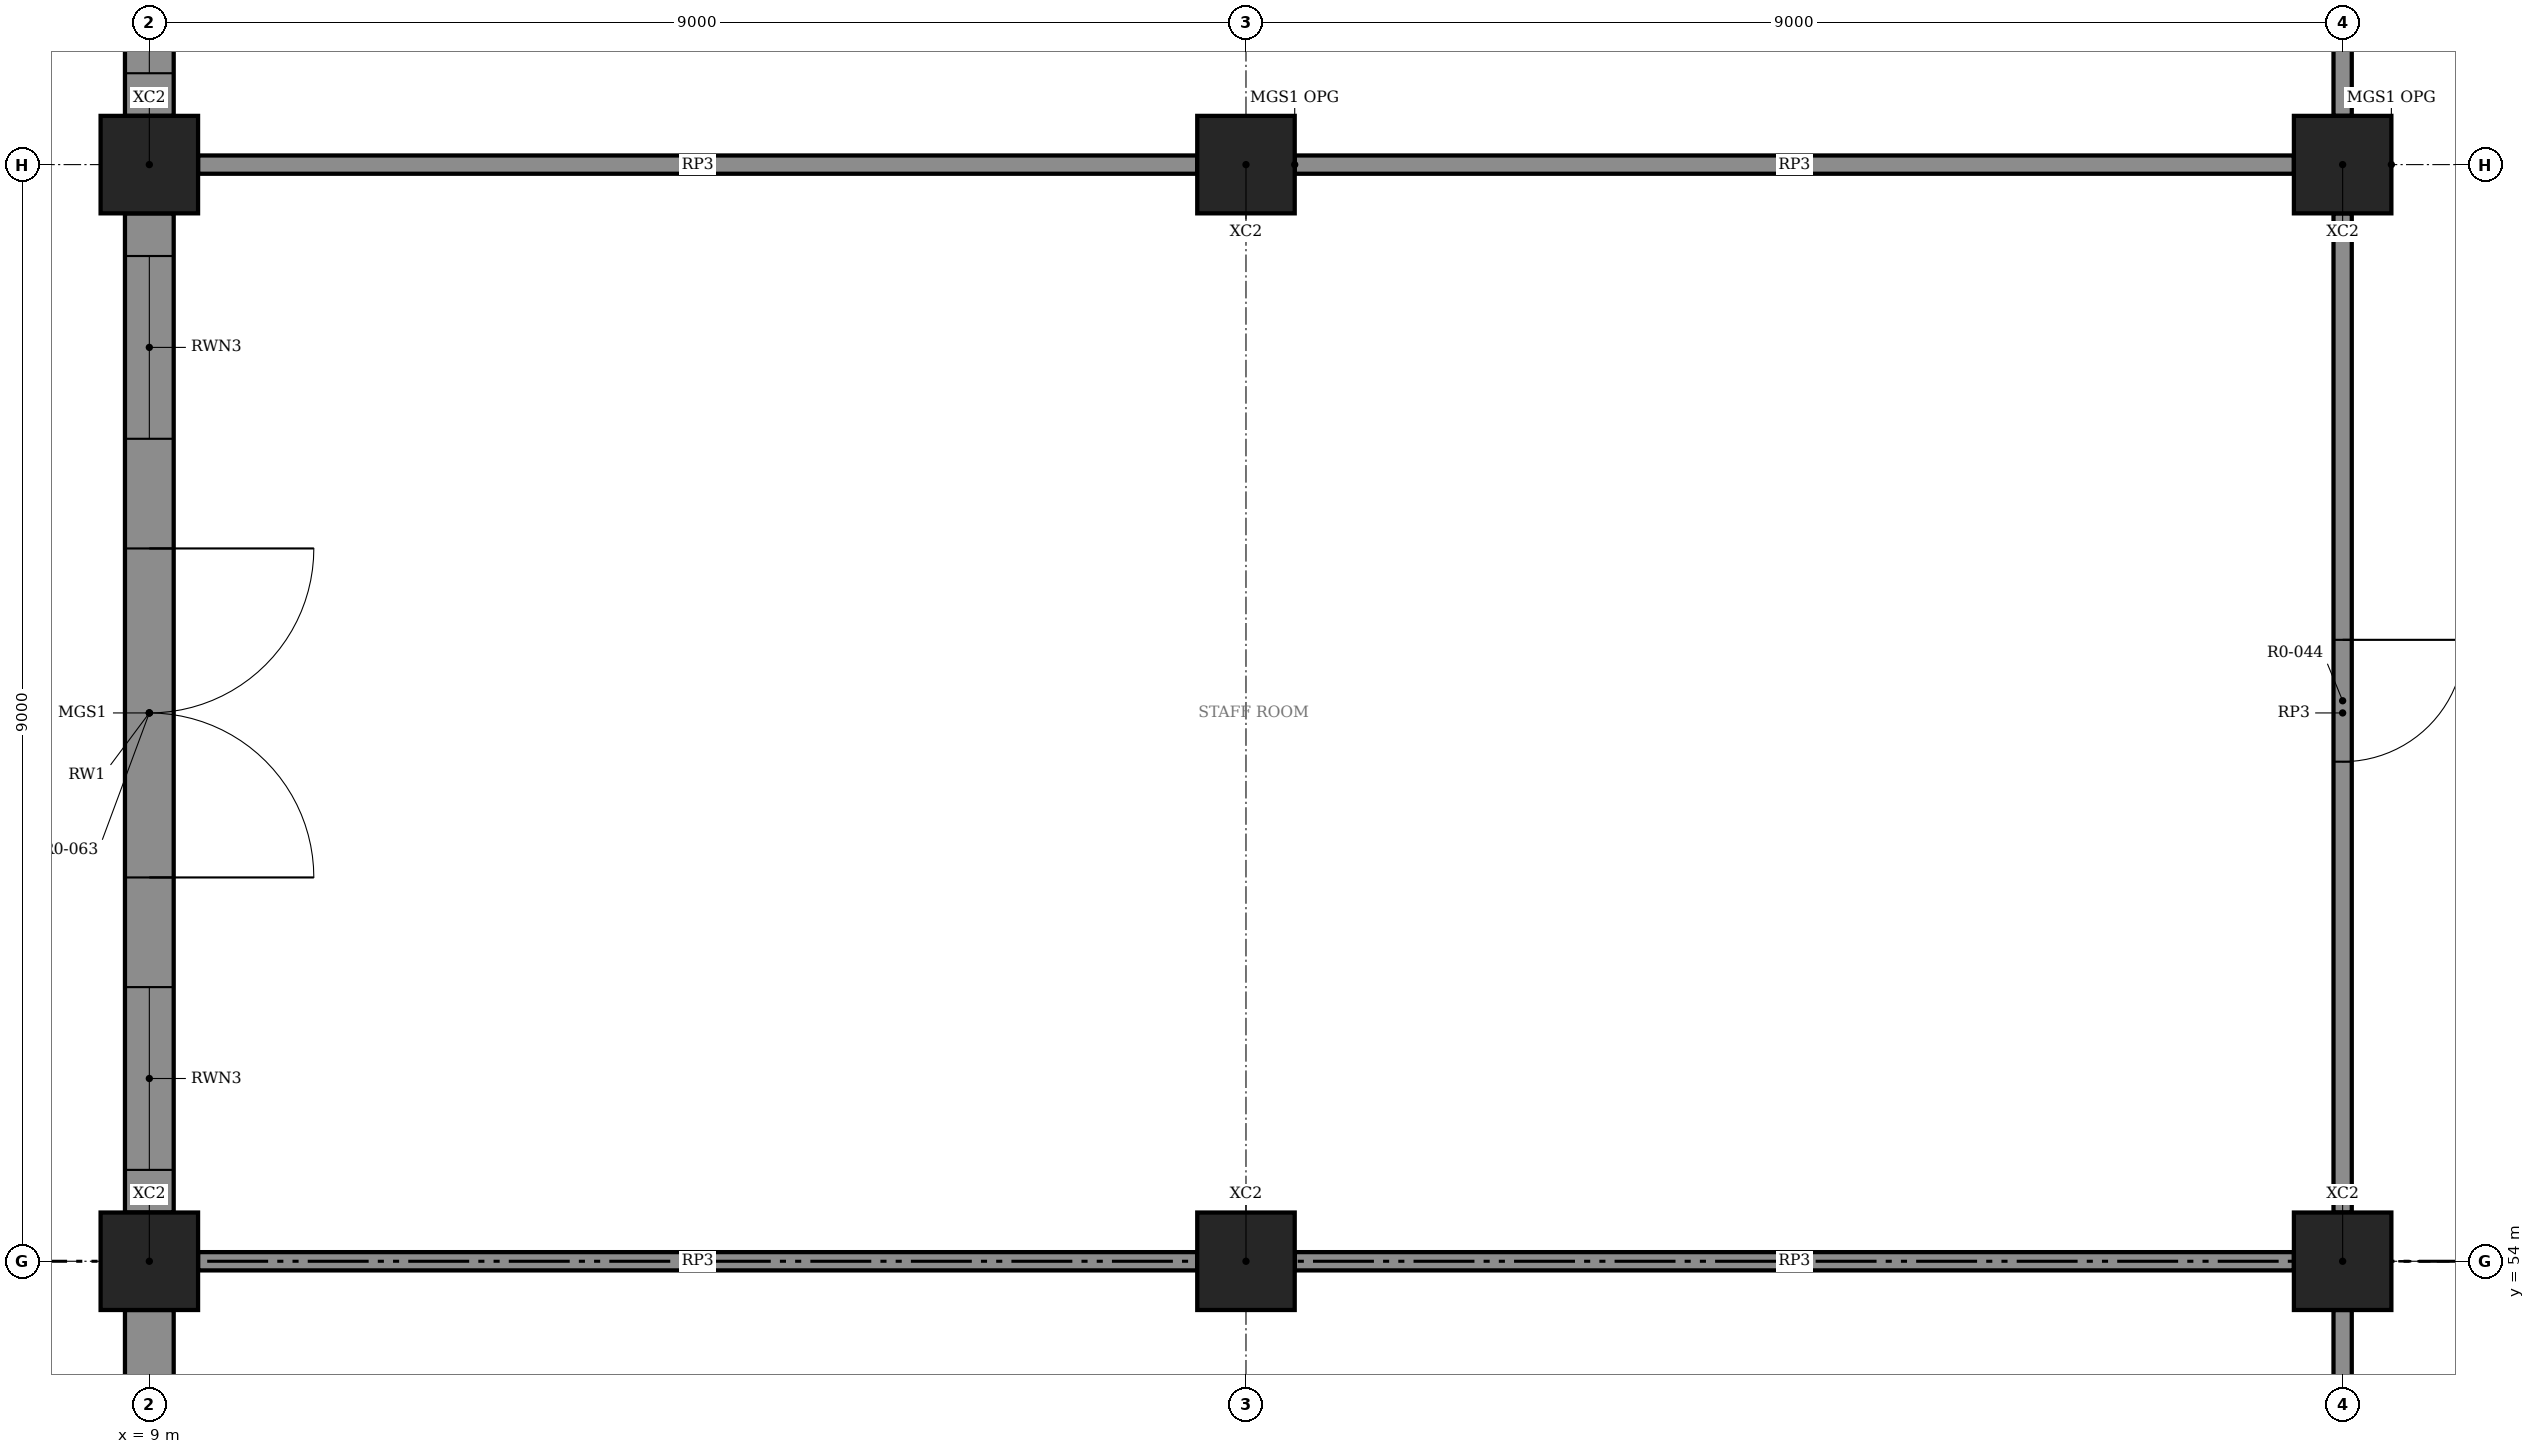
"""IFC4 building model, lengths in metres.
Left out: names, types, materials, properties, quantities, classifications, styles, units other than length and angle.
Written with IfcOpenShell. Run it as: python <this file> out.ifc"""

import sys

from ifc_helpers import new_model, si_unit, direction, frame, frame_2d, origin, origin_2d, place, context, subcontext, project, spatial, rectangle, extrude, element, fill, save


model = new_model("IFC4")
c1 = context("Model", 3, precision=1e-05, world=origin(), true_north=direction((0.0, 1.0)))
c2 = subcontext(c1, "Body", "Model", "MODEL_VIEW")
j1 = project(units=[si_unit("LENGTHUNIT", "METRE"), si_unit("PLANEANGLEUNIT", "RADIAN")], contexts=[c1])
p1 = place(None, origin())
s1 = spatial("IfcSite", under=j1, at=p1, CompositionType="ELEMENT")
p2 = place(p1, origin())
s2 = spatial("IfcBuilding", under=s1, at=p2, CompositionType="ELEMENT")
p3 = place(p2, origin())
s3 = spatial("IfcBuildingStorey", under=s2, at=p3, CompositionType="ELEMENT", Elevation=0.0)
for number, where, z_axis, x_axis in (
    (1, (9.0, 54.0, -0.3), (0.0, 0.0, 1.0), (1.0, 0.0, 0.0)),
    (2, (9.0, 63.0, -0.3), (0.0, 0.0, 1.0), (1.0, 0.0, 0.0)),
    (3, (18.0, 54.0, -0.3), (0.0, 0.0, 1.0), (1.0, 0.0, 0.0)),
    (4, (18.0, 63.0, -0.3), (0.0, 0.0, 1.0), (1.0, 0.0, 0.0)),
    (5, (27.0, 54.0, -0.3), (0.0, 0.0, 1.0), (1.0, 0.0, 0.0)),
    (6, (27.0, 63.0, -0.3), (0.0, 0.0, 1.0), (1.0, 0.0, 0.0)),
):
    element("IfcColumn", number, at=place(p3, frame(where, z_axis=z_axis, x_axis=x_axis)), inside=s3, PredefinedType="COLUMN", context=c2, shape_type="SweptSolid", body=[
        extrude(rectangle(XDim=0.8, YDim=0.8, at=origin_2d()), origin(), (0.0, 0.0, 1.0), 6.3),
    ])
p4 = place(p3, frame((9.0, 45.4, 0.0), z_axis=(0.0, 0.0, 1.0), x_axis=(0.0, 1.0, 0.0)))
e7 = element("IfcWall", 7, at=p4, inside=s3, PredefinedType="SOLIDWALL", context=c2, shape_type="SweptSolid", body=[
    extrude(rectangle(XDim=8.2, YDim=0.4, at=frame_2d((4.1, 0.0))), origin(), (0.0, 0.0, 1.0), 4.82),
])
p5 = place(p3, frame((9.0, 54.4, 0.0), z_axis=(0.0, 0.0, 1.0), x_axis=(0.0, 1.0, 0.0)))
e8 = element("IfcWall", 8, at=p5, inside=s3, PredefinedType="SOLIDWALL", context=c2, shape_type="SweptSolid", body=[
    extrude(rectangle(XDim=8.2, YDim=0.4, at=frame_2d((4.1, 0.0))), origin(), (0.0, 0.0, 1.0), 4.82),
])
p6 = place(p5, frame((0.35, 0.0, 0.6)))
e9 = element("IfcOpeningElement", 9, at=p6, cuts=e8, PredefinedType="OPENING", context=c2, shape_type="SweptSolid", body=[
    extrude(rectangle(XDim=1.5, YDim=2.7, at=frame_2d((0.75, 1.35))), frame((0.0, 0.21, 0.0), z_axis=(0.0, -1.0, 0.0), x_axis=(1.0, 0.0, 0.0)), (0.0, 0.0, 1.0), 0.42),
])
p7 = place(p5, frame((6.35, 0.0, 0.6)))
e10 = element("IfcOpeningElement", 10, at=p7, cuts=e8, PredefinedType="OPENING", context=c2, shape_type="SweptSolid", body=[
    extrude(rectangle(XDim=1.5, YDim=2.7, at=frame_2d((0.75, 1.35))), frame((0.0, 0.21, 0.0), z_axis=(0.0, -1.0, 0.0), x_axis=(1.0, 0.0, 0.0)), (0.0, 0.0, 1.0), 0.42),
])
p8 = place(p5, frame((2.75, 0.0, 0.0)))
e11 = element("IfcOpeningElement", 11, at=p8, cuts=e8, PredefinedType="OPENING", context=c2, shape_type="SweptSolid", body=[
    extrude(rectangle(XDim=2.7, YDim=2.4, at=frame_2d((1.35, 1.2))), frame((0.0, 0.21, 0.0), z_axis=(0.0, -1.0, 0.0), x_axis=(1.0, 0.0, 0.0)), (0.0, 0.0, 1.0), 0.42),
])
p9 = place(p3, frame((9.0, 63.4, 0.0), z_axis=(0.0, 0.0, 1.0), x_axis=(0.0, 1.0, 0.0)))
e12 = element("IfcWall", 12, at=p9, inside=s3, PredefinedType="SOLIDWALL", context=c2, shape_type="SweptSolid", body=[
    extrude(rectangle(XDim=8.2, YDim=0.4, at=frame_2d((4.1, 0.0))), origin(), (0.0, 0.0, 1.0), 4.82),
])
p10 = place(p9, frame((0.35, 0.0, 0.6)))
e13 = element("IfcOpeningElement", 13, at=p10, cuts=e12, PredefinedType="OPENING", context=c2, shape_type="SweptSolid", body=[
    extrude(rectangle(XDim=1.5, YDim=2.7, at=frame_2d((0.75, 1.35))), frame((0.0, 0.21, 0.0), z_axis=(0.0, -1.0, 0.0), x_axis=(1.0, 0.0, 0.0)), (0.0, 0.0, 1.0), 0.42),
])
for number, where, z_axis, x_axis in (
    (14, (9.4, 54.0, 0.0), (0.0, 0.0, 1.0), (1.0, 0.0, 0.0)),
    (15, (18.4, 54.0, 0.0), (0.0, 0.0, 1.0), (1.0, 0.0, 0.0)),
    (16, (9.4, 63.0, 0.0), (0.0, 0.0, 1.0), (1.0, 0.0, 0.0)),
    (17, (18.4, 63.0, 0.0), (0.0, 0.0, 1.0), (1.0, 0.0, 0.0)),
):
    element("IfcWall", number, at=place(p3, frame(where, z_axis=z_axis, x_axis=x_axis)), inside=s3, PredefinedType="PARTITIONING", context=c2, shape_type="SweptSolid", body=[
        extrude(rectangle(XDim=8.2, YDim=0.15, at=frame_2d((4.1, 0.0))), origin(), (0.0, 0.0, 1.0), 4.82),
    ])
p11 = place(p3, frame((27.0, 45.4, 0.0), z_axis=(0.0, 0.0, 1.0), x_axis=(0.0, 1.0, 0.0)))
e18 = element("IfcWall", 18, at=p11, inside=s3, PredefinedType="PARTITIONING", context=c2, shape_type="SweptSolid", body=[
    extrude(rectangle(XDim=8.2, YDim=0.15, at=frame_2d((4.1, 0.0))), origin(), (0.0, 0.0, 1.0), 4.82),
])
p12 = place(p11, frame((1.45, 0.0, 0.0)))
e19 = element("IfcOpeningElement", 19, at=p12, cuts=e18, PredefinedType="OPENING", context=c2, shape_type="SweptSolid", body=[
    extrude(rectangle(XDim=0.9, YDim=2.1, at=frame_2d((0.45, 1.05))), frame((0.0, 0.085, 0.0), z_axis=(0.0, -1.0, 0.0), x_axis=(1.0, 0.0, 0.0)), (0.0, 0.0, 1.0), 0.17),
])
p13 = place(p11, frame((5.95, 0.0, 0.0)))
e20 = element("IfcOpeningElement", 20, at=p13, cuts=e18, PredefinedType="OPENING", context=c2, shape_type="SweptSolid", body=[
    extrude(rectangle(XDim=0.9, YDim=2.1, at=frame_2d((0.45, 1.05))), frame((0.0, 0.085, 0.0), z_axis=(0.0, -1.0, 0.0), x_axis=(1.0, 0.0, 0.0)), (0.0, 0.0, 1.0), 0.17),
])
p14 = place(p3, frame((27.0, 54.4, 0.0), z_axis=(0.0, 0.0, 1.0), x_axis=(0.0, 1.0, 0.0)))
e21 = element("IfcWall", 21, at=p14, inside=s3, PredefinedType="PARTITIONING", context=c2, shape_type="SweptSolid", body=[
    extrude(rectangle(XDim=8.2, YDim=0.15, at=frame_2d((4.1, 0.0))), origin(), (0.0, 0.0, 1.0), 4.82),
])
p15 = place(p14, frame((3.7, 0.0, 0.0)))
e22 = element("IfcOpeningElement", 22, at=p15, cuts=e21, PredefinedType="OPENING", context=c2, shape_type="SweptSolid", body=[
    extrude(rectangle(XDim=1.0, YDim=2.4, at=frame_2d((0.5, 1.2))), frame((0.0, 0.085, 0.0), z_axis=(0.0, -1.0, 0.0), x_axis=(1.0, 0.0, 0.0)), (0.0, 0.0, 1.0), 0.17),
])
p16 = place(p3, frame((27.0, 63.4, 0.0), z_axis=(0.0, 0.0, 1.0), x_axis=(0.0, 1.0, 0.0)))
e23 = element("IfcWall", 23, at=p16, inside=s3, PredefinedType="PARTITIONING", context=c2, shape_type="SweptSolid", body=[
    extrude(rectangle(XDim=8.2, YDim=0.15, at=frame_2d((4.1, 0.0))), origin(), (0.0, 0.0, 1.0), 4.82),
])
p17 = place(p16, frame((1.45, 0.0, 0.0)))
e24 = element("IfcOpeningElement", 24, at=p17, cuts=e23, PredefinedType="OPENING", context=c2, shape_type="SweptSolid", body=[
    extrude(rectangle(XDim=1.0, YDim=2.4, at=frame_2d((0.5, 1.2))), frame((0.0, 0.085, 0.0), z_axis=(0.0, -1.0, 0.0), x_axis=(1.0, 0.0, 0.0)), (0.0, 0.0, 1.0), 0.17),
])
p18 = place(p16, frame((5.95, 0.0, 0.0)))
e25 = element("IfcOpeningElement", 25, at=p18, cuts=e23, PredefinedType="OPENING", context=c2, shape_type="SweptSolid", body=[
    extrude(rectangle(XDim=0.9, YDim=2.1, at=frame_2d((0.45, 1.05))), frame((0.0, 0.085, 0.0), z_axis=(0.0, -1.0, 0.0), x_axis=(1.0, 0.0, 0.0)), (0.0, 0.0, 1.0), 0.17),
])
p19 = place(p6, origin())
e26 = element("IfcWindow", 26, at=p19, inside=s3, PartitioningType="SINGLE_PANEL", PredefinedType="WINDOW", context=c2, shape_type="SweptSolid", body=[
    extrude(rectangle(XDim=1.5, YDim=2.7, at=frame_2d((0.75, 1.35))), frame((0.0, 0.03, 0.0), z_axis=(0.0, -1.0, 0.0), x_axis=(1.0, 0.0, 0.0)), (0.0, 0.0, 1.0), 0.06),
])
fill(e9, e26)
p20 = place(p7, origin())
e27 = element("IfcWindow", 27, at=p20, inside=s3, PartitioningType="SINGLE_PANEL", PredefinedType="WINDOW", context=c2, shape_type="SweptSolid", body=[
    extrude(rectangle(XDim=1.5, YDim=2.7, at=frame_2d((0.75, 1.35))), frame((0.0, 0.03, 0.0), z_axis=(0.0, -1.0, 0.0), x_axis=(1.0, 0.0, 0.0)), (0.0, 0.0, 1.0), 0.06),
])
fill(e10, e27)
p21 = place(p10, origin())
e28 = element("IfcWindow", 28, at=p21, inside=s3, PartitioningType="SINGLE_PANEL", PredefinedType="WINDOW", context=c2, shape_type="SweptSolid", body=[
    extrude(rectangle(XDim=1.5, YDim=2.7, at=frame_2d((0.75, 1.35))), frame((0.0, 0.03, 0.0), z_axis=(0.0, -1.0, 0.0), x_axis=(1.0, 0.0, 0.0)), (0.0, 0.0, 1.0), 0.06),
])
fill(e13, e28)
p22 = place(p15, frame((1.0, 0.0, 0.0), z_axis=(0.0, 0.0, 1.0), x_axis=(-1.0, 0.0, 0.0)))
e29 = element("IfcDoor", 29, at=p22, inside=s3, OperationType="SINGLE_SWING_LEFT", PredefinedType="DOOR", context=c2, shape_type="SweptSolid", body=[
    extrude(rectangle(XDim=1.0, YDim=2.4, at=frame_2d((0.5, 1.2))), frame((0.0, 0.025, 0.0), z_axis=(0.0, -1.0, 0.0), x_axis=(1.0, 0.0, 0.0)), (0.0, 0.0, 1.0), 0.05),
])
fill(e22, e29)
p23 = place(p8, frame((2.7, 0.0, 0.0), z_axis=(0.0, 0.0, 1.0), x_axis=(-1.0, 0.0, 0.0)))
e30 = element("IfcDoor", 30, at=p23, inside=s3, OperationType="DOUBLE_DOOR_SINGLE_SWING", PredefinedType="DOOR", context=c2, shape_type="SweptSolid", body=[
    extrude(rectangle(XDim=2.7, YDim=2.4, at=frame_2d((1.35, 1.2))), frame((0.0, 0.025, 0.0), z_axis=(0.0, -1.0, 0.0), x_axis=(1.0, 0.0, 0.0)), (0.0, 0.0, 1.0), 0.05),
])
fill(e11, e30)
save(model, sys.argv[1])
